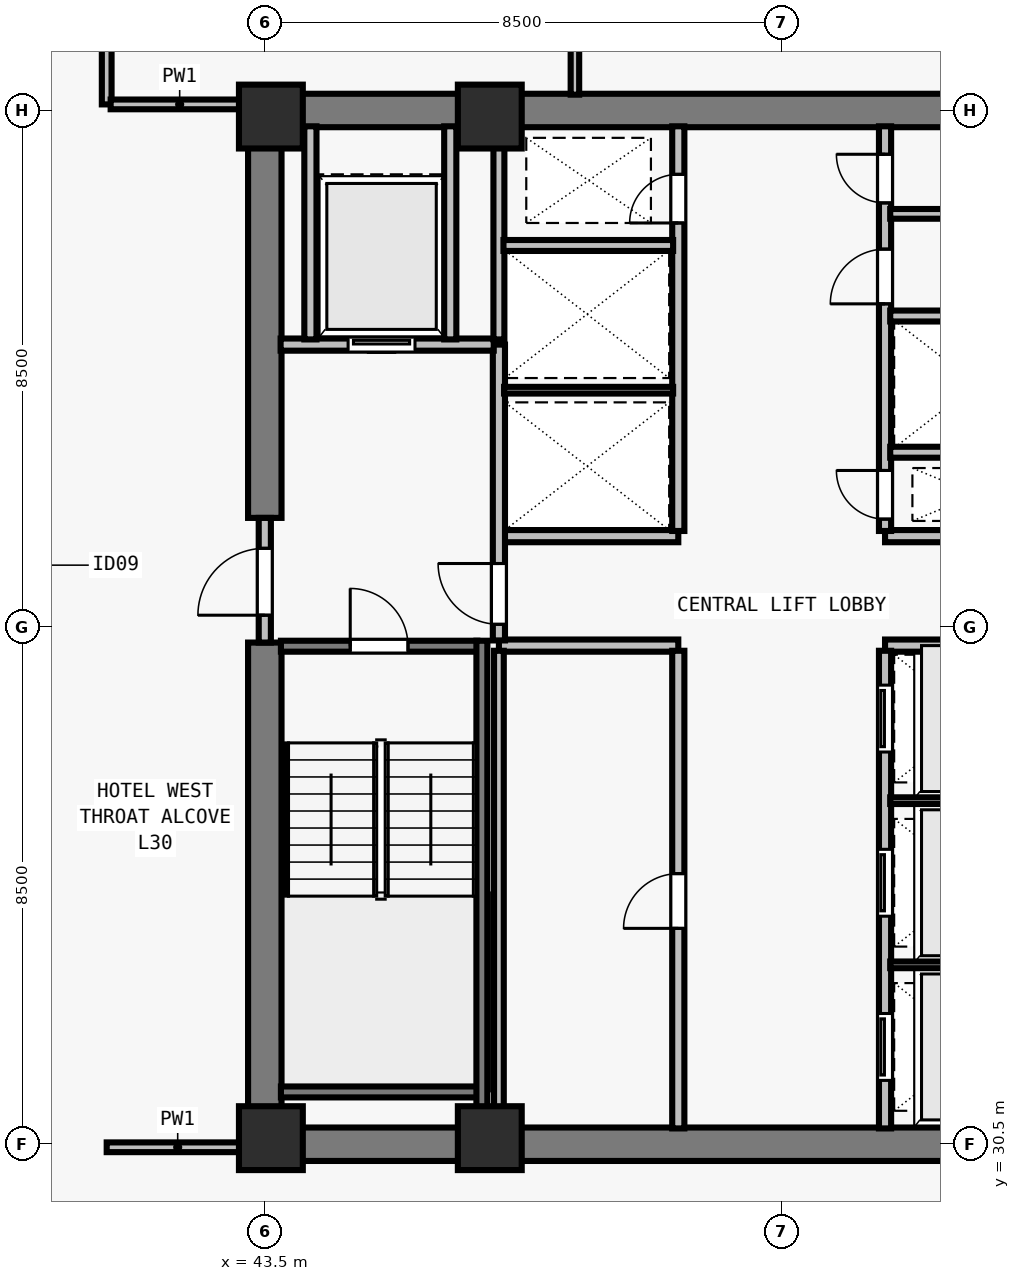
"""IFC4 building model, lengths in metres.
Left out: names, types, materials, properties, quantities, classifications, styles, units other than length and angle.
Written with IfcOpenShell. Run it as: python <this file> out.ifc"""

import sys

from ifc_helpers import new_model, si_unit, direction, frame, frame_2d, origin, origin_2d, place, context, subcontext, project, spatial, rectangle, extrude, element, fill, save


model = new_model("IFC4")
c1 = context("Model", 3, precision=1e-05, world=origin(), true_north=direction((0.0, 1.0)))
c2 = subcontext(c1, "Body", "Model", "MODEL_VIEW")
j1 = project(units=[si_unit("LENGTHUNIT", "METRE"), si_unit("PLANEANGLEUNIT", "RADIAN")], contexts=[c1])
p1 = place(None, origin())
s1 = spatial("IfcSite", under=j1, at=p1, CompositionType="ELEMENT")
p2 = place(p1, origin())
s2 = spatial("IfcBuilding", under=s1, at=p2, CompositionType="ELEMENT")
p3 = place(p2, frame((0.0, 0.0, 113.0)))
s3 = spatial("IfcBuildingStorey", under=s2, at=p3, CompositionType="ELEMENT", Elevation=113.0)
for number, where, z_axis, x_axis in (
    (1, (43.6, 30.6, 0.0), (0.0, 0.0, 1.0), (1.0, 0.0, 0.0)),
    (2, (47.2, 30.6, 0.0), (0.0, 0.0, 1.0), (1.0, 0.0, 0.0)),
    (3, (43.6, 47.4, 0.0), (0.0, 0.0, 1.0), (1.0, 0.0, 0.0)),
    (4, (47.2, 47.4, 0.0), (0.0, 0.0, 1.0), (1.0, 0.0, 0.0)),
):
    element("IfcColumn", number, at=place(p3, frame(where, z_axis=z_axis, x_axis=x_axis)), inside=s3, PredefinedType="COLUMN", context=c2, shape_type="SweptSolid", body=[
        extrude(rectangle(XDim=1.05, YDim=1.05, at=origin_2d()), origin(), (0.0, 0.0, 1.0), 3.5),
    ])
for number, where, z_axis, x_axis in (
    (5, (43.225, 30.5, 0.0), (0.0, 0.0, 1.0), (1.0, 0.0, 0.0)),
    (6, (43.225, 47.5, 0.0), (0.0, 0.0, 1.0), (1.0, 0.0, 0.0)),
):
    element("IfcWall", number, at=place(p3, frame(where, z_axis=z_axis, x_axis=x_axis)), inside=s3, PredefinedType="SHEAR", context=c2, shape_type="SweptSolid", body=[
        extrude(rectangle(XDim=17.55, YDim=0.55, at=frame_2d((8.775, 0.0))), origin(), (0.0, 0.0, 1.0), 3.28),
    ])
p4 = place(p3, frame((43.5, 30.765, 0.0), z_axis=(0.0, 0.0, 1.0), x_axis=(0.0, 1.0, 0.0)))
e7 = element("IfcWall", 7, at=p4, inside=s3, PredefinedType="SHEAR", context=c2, shape_type="SweptSolid", body=[
    extrude(rectangle(XDim=7.985, YDim=0.55, at=frame_2d((3.993, 0.0))), origin(), (0.0, 0.0, 1.0), 3.28),
])
p5 = place(p3, frame((43.5, 40.8, 0.0), z_axis=(0.0, 0.0, 1.0), x_axis=(0.0, 1.0, 0.0)))
e8 = element("IfcWall", 8, at=p5, inside=s3, PredefinedType="SHEAR", context=c2, shape_type="SweptSolid", body=[
    extrude(rectangle(XDim=6.435, YDim=0.55, at=frame_2d((3.218, 0.0))), origin(), (0.0, 0.0, 1.0), 3.28),
])
for number, where, z_axis, x_axis in (
    (9, (47.35, 38.7, 0.0), (0.0, 0.0, 1.0), (1.0, 0.0, 0.0)),
    (10, (47.35, 40.5, 0.0), (0.0, 0.0, 1.0), (1.0, 0.0, 0.0)),
    (11, (53.7, 38.7, 0.0), (0.0, 0.0, 1.0), (1.0, 0.0, 0.0)),
    (12, (53.7, 40.5, 0.0), (0.0, 0.0, 1.0), (1.0, 0.0, 0.0)),
):
    element("IfcWall", number, at=place(p3, frame(where, z_axis=z_axis, x_axis=x_axis)), inside=s3, PredefinedType="SOLIDWALL", context=c2, shape_type="SweptSolid", body=[
        extrude(rectangle(XDim=2.95, YDim=0.2, at=frame_2d((1.475, 0.0))), origin(), (0.0, 0.0, 1.0), 3.28),
    ])
p6 = place(p3, frame((50.3, 30.76, 0.0), z_axis=(0.0, 0.0, 1.0), x_axis=(0.0, 1.0, 0.0)))
e13 = element("IfcWall", 13, at=p6, inside=s3, PredefinedType="SOLIDWALL", context=c2, shape_type="SweptSolid", body=[
    extrude(rectangle(XDim=7.855, YDim=0.2, at=frame_2d((3.927, 0.0))), origin(), (0.0, 0.0, 1.0), 3.28),
])
p7 = place(p6, frame((3.29, 0.0, 0.0)))
e14 = element("IfcOpeningElement", 14, at=p7, cuts=e13, PredefinedType="OPENING", context=c2, shape_type="SweptSolid", body=[
    extrude(rectangle(XDim=0.9, YDim=2.12, at=frame_2d((0.45, 1.06))), frame((0.0, 0.11, 0.0), z_axis=(0.0, -1.0, 0.0), x_axis=(1.0, 0.0, 0.0)), (0.0, 0.0, 1.0), 0.22),
])
p8 = place(p3, frame((53.7, 30.76, 0.0), z_axis=(0.0, 0.0, 1.0), x_axis=(0.0, 1.0, 0.0)))
e15 = element("IfcWall", 15, at=p8, inside=s3, PredefinedType="SOLIDWALL", context=c2, shape_type="SweptSolid", body=[
    extrude(rectangle(XDim=7.855, YDim=0.2, at=frame_2d((3.927, 0.0))), origin(), (0.0, 0.0, 1.0), 3.28),
])
p9 = place(p8, frame((0.79, 0.0, 0.0)))
e16 = element("IfcOpeningElement", 16, at=p9, cuts=e15, PredefinedType="OPENING", context=c2, shape_type="SweptSolid", body=[
    extrude(rectangle(XDim=1.1, YDim=2.2, at=frame_2d((0.55, 1.1))), frame((0.0, 0.11, 0.0), z_axis=(0.0, -1.0, 0.0), x_axis=(1.0, 0.0, 0.0)), (0.0, 0.0, 1.0), 0.22),
])
p10 = place(p8, frame((3.49, 0.0, 0.0)))
e17 = element("IfcOpeningElement", 17, at=p10, cuts=e15, PredefinedType="OPENING", context=c2, shape_type="SweptSolid", body=[
    extrude(rectangle(XDim=1.1, YDim=2.2, at=frame_2d((0.55, 1.1))), frame((0.0, 0.11, 0.0), z_axis=(0.0, -1.0, 0.0), x_axis=(1.0, 0.0, 0.0)), (0.0, 0.0, 1.0), 0.22),
])
p11 = place(p8, frame((6.19, 0.0, 0.0)))
e18 = element("IfcOpeningElement", 18, at=p11, cuts=e15, PredefinedType="OPENING", context=c2, shape_type="SweptSolid", body=[
    extrude(rectangle(XDim=1.1, YDim=2.2, at=frame_2d((0.55, 1.1))), frame((0.0, 0.11, 0.0), z_axis=(0.0, -1.0, 0.0), x_axis=(1.0, 0.0, 0.0)), (0.0, 0.0, 1.0), 0.22),
])
p12 = place(p3, frame((50.3, 40.585, 0.0), z_axis=(0.0, 0.0, 1.0), x_axis=(0.0, 1.0, 0.0)))
e19 = element("IfcWall", 19, at=p12, inside=s3, PredefinedType="SOLIDWALL", context=c2, shape_type="SweptSolid", body=[
    extrude(rectangle(XDim=6.655, YDim=0.2, at=frame_2d((3.328, 0.0))), origin(), (0.0, 0.0, 1.0), 3.28),
])
p13 = place(p12, frame((5.065, 0.0, 0.0)))
e20 = element("IfcOpeningElement", 20, at=p13, cuts=e19, PredefinedType="OPENING", context=c2, shape_type="SweptSolid", body=[
    extrude(rectangle(XDim=0.8, YDim=2.08, at=frame_2d((0.4, 1.04))), frame((0.0, 0.11, 0.0), z_axis=(0.0, -1.0, 0.0), x_axis=(1.0, 0.0, 0.0)), (0.0, 0.0, 1.0), 0.22),
])
p14 = place(p3, frame((53.7, 40.585, 0.0), z_axis=(0.0, 0.0, 1.0), x_axis=(0.0, 1.0, 0.0)))
e21 = element("IfcWall", 21, at=p14, inside=s3, PredefinedType="SOLIDWALL", context=c2, shape_type="SweptSolid", body=[
    extrude(rectangle(XDim=6.655, YDim=0.2, at=frame_2d((3.328, 0.0))), origin(), (0.0, 0.0, 1.0), 3.28),
])
p15 = place(p14, frame((0.195, 0.0, 0.0)))
e22 = element("IfcOpeningElement", 22, at=p15, cuts=e21, PredefinedType="OPENING", context=c2, shape_type="SweptSolid", body=[
    extrude(rectangle(XDim=0.8, YDim=2.08, at=frame_2d((0.4, 1.04))), frame((0.0, 0.11, 0.0), z_axis=(0.0, -1.0, 0.0), x_axis=(1.0, 0.0, 0.0)), (0.0, 0.0, 1.0), 0.22),
])
p16 = place(p14, frame((3.735, 0.0, 0.0)))
e23 = element("IfcOpeningElement", 23, at=p16, cuts=e21, PredefinedType="OPENING", context=c2, shape_type="SweptSolid", body=[
    extrude(rectangle(XDim=0.9, YDim=2.12, at=frame_2d((0.45, 1.06))), frame((0.0, 0.11, 0.0), z_axis=(0.0, -1.0, 0.0), x_axis=(1.0, 0.0, 0.0)), (0.0, 0.0, 1.0), 0.22),
])
p17 = place(p14, frame((5.395, 0.0, 0.0)))
e24 = element("IfcOpeningElement", 24, at=p17, cuts=e21, PredefinedType="OPENING", context=c2, shape_type="SweptSolid", body=[
    extrude(rectangle(XDim=0.8, YDim=2.1, at=frame_2d((0.4, 1.05))), frame((0.0, 0.11, 0.0), z_axis=(0.0, -1.0, 0.0), x_axis=(1.0, 0.0, 0.0)), (0.0, 0.0, 1.0), 0.22),
])
p18 = place(p3, frame((43.5, 38.75, 0.0), z_axis=(0.0, 0.0, 1.0), x_axis=(0.0, 1.0, 0.0)))
e25 = element("IfcWall", 25, at=p18, inside=s3, PredefinedType="SOLIDWALL", context=c2, shape_type="SweptSolid", body=[
    extrude(rectangle(XDim=2.05, YDim=0.2, at=frame_2d((1.025, 0.0))), origin(), (0.0, 0.0, 1.0), 3.28),
])
p19 = place(p18, frame((0.45, 0.0, 0.0)))
e26 = element("IfcOpeningElement", 26, at=p19, cuts=e25, PredefinedType="OPENING", context=c2, shape_type="SweptSolid", body=[
    extrude(rectangle(XDim=1.1, YDim=2.15, at=frame_2d((0.55, 1.075))), frame((0.0, 0.11, 0.0), z_axis=(0.0, -1.0, 0.0), x_axis=(1.0, 0.0, 0.0)), (0.0, 0.0, 1.0), 0.22),
])
p20 = place(p3, frame((47.35, 38.785, 0.0), z_axis=(0.0, 0.0, 1.0), x_axis=(0.0, 1.0, 0.0)))
e27 = element("IfcWall", 27, at=p20, inside=s3, PredefinedType="SOLIDWALL", context=c2, shape_type="SweptSolid", body=[
    extrude(rectangle(XDim=4.865, YDim=0.2, at=frame_2d((2.433, 0.0))), origin(), (0.0, 0.0, 1.0), 3.28),
])
p21 = place(p20, frame((0.265, 0.0, 0.0)))
e28 = element("IfcOpeningElement", 28, at=p21, cuts=e27, PredefinedType="OPENING", context=c2, shape_type="SweptSolid", body=[
    extrude(rectangle(XDim=1.0, YDim=2.15, at=frame_2d((0.5, 1.075))), frame((0.0, 0.11, 0.0), z_axis=(0.0, -1.0, 0.0), x_axis=(1.0, 0.0, 0.0)), (0.0, 0.0, 1.0), 0.22),
])
p22 = place(p3, frame((43.76, 43.65, 0.0), z_axis=(0.0, 0.0, 1.0), x_axis=(1.0, 0.0, 0.0)))
e29 = element("IfcWall", 29, at=p22, inside=s3, PredefinedType="SOLIDWALL", context=c2, shape_type="SweptSolid", body=[
    extrude(rectangle(XDim=3.505, YDim=0.2, at=frame_2d((1.752, 0.0))), origin(), (0.0, 0.0, 1.0), 3.28),
])
p23 = place(p22, frame((1.11, 0.0, 0.0)))
e30 = element("IfcOpeningElement", 30, at=p23, cuts=e29, PredefinedType="OPENING", context=c2, shape_type="SweptSolid", body=[
    extrude(rectangle(XDim=1.1, YDim=2.2, at=frame_2d((0.55, 1.1))), frame((0.0, 0.11, 0.0), z_axis=(0.0, -1.0, 0.0), x_axis=(1.0, 0.0, 0.0)), (0.0, 0.0, 1.0), 0.22),
])
for number, where, z_axis, x_axis in (
    (31, (46.55, 43.735, 0.0), (0.0, 0.0, 1.0), (0.0, 1.0, 0.0)),
    (32, (44.25, 43.735, 0.0), (0.0, 0.0, 1.0), (0.0, 1.0, 0.0)),
):
    element("IfcWall", number, at=place(p3, frame(where, z_axis=z_axis, x_axis=x_axis)), inside=s3, PredefinedType="SOLIDWALL", context=c2, shape_type="SweptSolid", body=[
        extrude(rectangle(XDim=3.505, YDim=0.2, at=frame_2d((1.752, 0.0))), origin(), (0.0, 0.0, 1.0), 3.28),
    ])
p24 = place(p3, frame((47.35, 30.76, 0.0), z_axis=(0.0, 0.0, 1.0), x_axis=(0.0, 1.0, 0.0)))
e33 = element("IfcWall", 33, at=p24, inside=s3, PredefinedType="PARTITIONING", context=c2, shape_type="SweptSolid", body=[
    extrude(rectangle(XDim=7.855, YDim=0.16, at=frame_2d((3.927, 0.0))), origin(), (0.0, 0.0, 1.0), 3.28),
])
for number, where, z_axis, x_axis in (
    (34, (53.785, 33.45, 0.0), (0.0, 0.0, 1.0), (1.0, 0.0, 0.0)),
    (35, (53.785, 36.15, 0.0), (0.0, 0.0, 1.0), (1.0, 0.0, 0.0)),
):
    element("IfcWall", number, at=place(p3, frame(where, z_axis=z_axis, x_axis=x_axis)), inside=s3, PredefinedType="PARTITIONING", context=c2, shape_type="SweptSolid", body=[
        extrude(rectangle(XDim=2.79, YDim=0.11, at=frame_2d((1.395, 0.0))), origin(), (0.0, 0.0, 1.0), 3.28),
    ])
p25 = place(p3, frame((47.35, 43.735, 0.0), z_axis=(0.0, 0.0, 1.0), x_axis=(0.0, 1.0, 0.0)))
e36 = element("IfcWall", 36, at=p25, inside=s3, PredefinedType="SOLIDWALL", context=c2, shape_type="SweptSolid", body=[
    extrude(rectangle(XDim=3.505, YDim=0.18, at=frame_2d((1.752, 0.0))), origin(), (0.0, 0.0, 1.0), 3.28),
])
p26 = place(p3, frame((47.435, 42.9, 0.0), z_axis=(0.0, 0.0, 1.0), x_axis=(1.0, 0.0, 0.0)))
e37 = element("IfcWall", 37, at=p26, inside=s3, PredefinedType="PARTITIONING", context=c2, shape_type="SweptSolid", body=[
    extrude(rectangle(XDim=2.78, YDim=0.11, at=frame_2d((1.39, 0.0))), origin(), (0.0, 0.0, 1.0), 3.28),
])
p27 = place(p3, frame((47.425, 45.28, 0.0), z_axis=(0.0, 0.0, 1.0), x_axis=(1.0, 0.0, 0.0)))
e38 = element("IfcWall", 38, at=p27, inside=s3, PredefinedType="SOLIDWALL", context=c2, shape_type="SweptSolid", body=[
    extrude(rectangle(XDim=2.79, YDim=0.18, at=frame_2d((1.395, 0.0))), origin(), (0.0, 0.0, 1.0), 3.28),
])
p28 = place(p3, frame((53.785, 41.88, 0.0), z_axis=(0.0, 0.0, 1.0), x_axis=(1.0, 0.0, 0.0)))
e39 = element("IfcWall", 39, at=p28, inside=s3, PredefinedType="SOLIDWALL", context=c2, shape_type="SweptSolid", body=[
    extrude(rectangle(XDim=2.78, YDim=0.18, at=frame_2d((1.39, 0.0))), origin(), (0.0, 0.0, 1.0), 3.28),
])
p29 = place(p3, frame((53.785, 44.12, 0.0), z_axis=(0.0, 0.0, 1.0), x_axis=(1.0, 0.0, 0.0)))
e40 = element("IfcWall", 40, at=p29, inside=s3, PredefinedType="SOLIDWALL", context=c2, shape_type="SweptSolid", body=[
    extrude(rectangle(XDim=2.79, YDim=0.18, at=frame_2d((1.395, 0.0))), origin(), (0.0, 0.0, 1.0), 3.28),
])
p30 = place(p3, frame((53.785, 45.8, 0.0), z_axis=(0.0, 0.0, 1.0), x_axis=(1.0, 0.0, 0.0)))
e41 = element("IfcWall", 41, at=p30, inside=s3, PredefinedType="PARTITIONING", context=c2, shape_type="SweptSolid", body=[
    extrude(rectangle(XDim=2.79, YDim=0.16, at=frame_2d((1.395, 0.0))), origin(), (0.0, 0.0, 1.0), 3.28),
])
p31 = place(p3, frame((40.9, 47.6, 0.0), z_axis=(0.0, 0.0, 1.0), x_axis=(0.0, 1.0, 0.0)))
e42 = element("IfcWall", 42, at=p31, inside=s3, PredefinedType="PARTITIONING", context=c2, shape_type="SweptSolid", body=[
    extrude(rectangle(XDim=15.075, YDim=0.16, at=frame_2d((7.538, 0.0))), origin(), (0.0, 0.0, 1.0), 2.555),
])
p32 = place(p31, frame((3.5, 0.0, 0.0)))
e43 = element("IfcOpeningElement", 43, at=p32, cuts=e42, PredefinedType="OPENING", context=c2, shape_type="SweptSolid", body=[
    extrude(rectangle(XDim=0.96, YDim=2.12, at=frame_2d((0.48, 1.06))), frame((0.0, 0.09, 0.0), z_axis=(0.0, -1.0, 0.0), x_axis=(1.0, 0.0, 0.0)), (0.0, 0.0, 1.0), 0.18),
])
p33 = place(p3, frame((40.9, 30.45, 0.0), z_axis=(0.0, 0.0, 1.0), x_axis=(1.0, 0.0, 0.0)))
e44 = element("IfcWall", 44, at=p33, inside=s3, PredefinedType="PARTITIONING", context=c2, shape_type="SweptSolid", body=[
    extrude(rectangle(XDim=2.335, YDim=0.16, at=frame_2d((1.167, 0.0))), origin(), (0.0, 0.0, 1.0), 3.28),
])
p34 = place(p3, frame((40.965, 47.6, 0.0), z_axis=(0.0, 0.0, 1.0), x_axis=(1.0, 0.0, 0.0)))
e45 = element("IfcWall", 45, at=p34, inside=s3, PredefinedType="PARTITIONING", context=c2, shape_type="SweptSolid", body=[
    extrude(rectangle(XDim=2.27, YDim=0.16, at=frame_2d((1.135, 0.0))), origin(), (0.0, 0.0, 1.0), 3.28),
])
p35 = place(p3, frame((48.6, 47.76, 0.0), z_axis=(0.0, 0.0, 1.0), x_axis=(0.0, 1.0, 0.0)))
e46 = element("IfcWall", 46, at=p35, inside=s3, PredefinedType="PARTITIONING", context=c2, shape_type="SweptSolid", body=[
    extrude(rectangle(XDim=14.915, YDim=0.14, at=frame_2d((7.458, 0.0))), origin(), (0.0, 0.0, 1.0), 2.896),
])
p36 = place(p35, frame((2.34, 0.0, 0.0)))
e47 = element("IfcOpeningElement", 47, at=p36, cuts=e46, PredefinedType="OPENING", context=c2, shape_type="SweptSolid", body=[
    extrude(rectangle(XDim=0.96, YDim=2.12, at=frame_2d((0.48, 1.06))), frame((0.0, 0.08, 0.0), z_axis=(0.0, -1.0, 0.0), x_axis=(1.0, 0.0, 0.0)), (0.0, 0.0, 1.0), 0.16),
])
p37 = place(p3, frame((43.765, 38.69, 0.0), z_axis=(0.0, 0.0, 1.0), x_axis=(1.0, 0.0, 0.0)))
e48 = element("IfcWall", 48, at=p37, inside=s3, PredefinedType="SOLIDWALL", context=c2, shape_type="SweptSolid", body=[
    extrude(rectangle(XDim=3.23, YDim=0.18, at=frame_2d((1.615, 0.0))), origin(), (0.0, 0.0, 1.0), 3.28),
])
p38 = place(p37, frame((1.14, 0.0, 0.0)))
e49 = element("IfcOpeningElement", 49, at=p38, cuts=e48, PredefinedType="OPENING", context=c2, shape_type="SweptSolid", body=[
    extrude(rectangle(XDim=0.95, YDim=2.15, at=frame_2d((0.475, 1.075))), frame((0.0, 0.1, 0.0), z_axis=(0.0, -1.0, 0.0), x_axis=(1.0, 0.0, 0.0)), (0.0, 0.0, 1.0), 0.2),
])
p39 = place(p3, frame((43.765, 31.36, 0.0), z_axis=(0.0, 0.0, 1.0), x_axis=(1.0, 0.0, 0.0)))
e50 = element("IfcWall", 50, at=p39, inside=s3, PredefinedType="SOLIDWALL", context=c2, shape_type="SweptSolid", body=[
    extrude(rectangle(XDim=3.23, YDim=0.18, at=frame_2d((1.615, 0.0))), origin(), (0.0, 0.0, 1.0), 3.28),
])
p40 = place(p3, frame((47.07, 38.78, 0.0), z_axis=(0.0, 0.0, 1.0), x_axis=(0.0, -1.0, 0.0)))
e51 = element("IfcWall", 51, at=p40, inside=s3, PredefinedType="SOLIDWALL", context=c2, shape_type="SweptSolid", body=[
    extrude(rectangle(XDim=8.017, YDim=0.18, at=frame_2d((4.009, 0.0))), origin(), (0.0, 0.0, 1.0), 3.28),
])
p41 = place(p19, origin())
e52 = element("IfcDoor", 52, at=p41, inside=s3, OperationType="SINGLE_SWING_LEFT", PredefinedType="DOOR", context=c2, shape_type="SweptSolid", body=[
    extrude(rectangle(XDim=1.1, YDim=2.15, at=frame_2d((0.55, 1.075))), frame((0.0, 0.025, 0.0), z_axis=(0.0, -1.0, 0.0), x_axis=(1.0, 0.0, 0.0)), (0.0, 0.0, 1.0), 0.05),
])
fill(e26, e52)
p42 = place(p21, origin())
e53 = element("IfcDoor", 53, at=p42, inside=s3, OperationType="SINGLE_SWING_RIGHT", PredefinedType="DOOR", context=c2, shape_type="SweptSolid", body=[
    extrude(rectangle(XDim=1.0, YDim=2.15, at=frame_2d((0.5, 1.075))), frame((0.0, 0.025, 0.0), z_axis=(0.0, -1.0, 0.0), x_axis=(1.0, 0.0, 0.0)), (0.0, 0.0, 1.0), 0.05),
])
fill(e28, e53)
p43 = place(p23, origin())
e54 = element("IfcDoor", 54, at=p43, inside=s3, OperationType="SLIDING_TO_LEFT", PredefinedType="DOOR", context=c2, shape_type="SweptSolid", body=[
    extrude(rectangle(XDim=1.1, YDim=2.2, at=frame_2d((0.55, 1.1))), frame((0.0, 0.025, 0.0), z_axis=(0.0, -1.0, 0.0), x_axis=(1.0, 0.0, 0.0)), (0.0, 0.0, 1.0), 0.05),
])
fill(e30, e54)
p44 = place(p7, origin())
e55 = element("IfcDoor", 55, at=p44, inside=s3, OperationType="SINGLE_SWING_LEFT", PredefinedType="DOOR", context=c2, shape_type="SweptSolid", body=[
    extrude(rectangle(XDim=0.9, YDim=2.12, at=frame_2d((0.45, 1.06))), frame((0.0, 0.025, 0.0), z_axis=(0.0, -1.0, 0.0), x_axis=(1.0, 0.0, 0.0)), (0.0, 0.0, 1.0), 0.05),
])
fill(e14, e55)
p45 = place(p9, origin())
e56 = element("IfcDoor", 56, at=p45, inside=s3, OperationType="SLIDING_TO_LEFT", PredefinedType="DOOR", context=c2, shape_type="SweptSolid", body=[
    extrude(rectangle(XDim=1.1, YDim=2.2, at=frame_2d((0.55, 1.1))), frame((0.0, 0.025, 0.0), z_axis=(0.0, -1.0, 0.0), x_axis=(1.0, 0.0, 0.0)), (0.0, 0.0, 1.0), 0.05),
])
fill(e16, e56)
p46 = place(p10, origin())
e57 = element("IfcDoor", 57, at=p46, inside=s3, OperationType="SLIDING_TO_LEFT", PredefinedType="DOOR", context=c2, shape_type="SweptSolid", body=[
    extrude(rectangle(XDim=1.1, YDim=2.2, at=frame_2d((0.55, 1.1))), frame((0.0, 0.025, 0.0), z_axis=(0.0, -1.0, 0.0), x_axis=(1.0, 0.0, 0.0)), (0.0, 0.0, 1.0), 0.05),
])
fill(e17, e57)
p47 = place(p11, origin())
e58 = element("IfcDoor", 58, at=p47, inside=s3, OperationType="SLIDING_TO_LEFT", PredefinedType="DOOR", context=c2, shape_type="SweptSolid", body=[
    extrude(rectangle(XDim=1.1, YDim=2.2, at=frame_2d((0.55, 1.1))), frame((0.0, 0.025, 0.0), z_axis=(0.0, -1.0, 0.0), x_axis=(1.0, 0.0, 0.0)), (0.0, 0.0, 1.0), 0.05),
])
fill(e18, e58)
p48 = place(p13, origin())
e59 = element("IfcDoor", 59, at=p48, inside=s3, OperationType="SINGLE_SWING_LEFT", PredefinedType="DOOR", context=c2, shape_type="SweptSolid", body=[
    extrude(rectangle(XDim=0.8, YDim=2.08, at=frame_2d((0.4, 1.04))), frame((0.0, 0.025, 0.0), z_axis=(0.0, -1.0, 0.0), x_axis=(1.0, 0.0, 0.0)), (0.0, 0.0, 1.0), 0.05),
])
fill(e20, e59)
p49 = place(p15, origin())
e60 = element("IfcDoor", 60, at=p49, inside=s3, OperationType="SINGLE_SWING_RIGHT", PredefinedType="DOOR", context=c2, shape_type="SweptSolid", body=[
    extrude(rectangle(XDim=0.8, YDim=2.08, at=frame_2d((0.4, 1.04))), frame((0.0, 0.025, 0.0), z_axis=(0.0, -1.0, 0.0), x_axis=(1.0, 0.0, 0.0)), (0.0, 0.0, 1.0), 0.05),
])
fill(e22, e60)
p50 = place(p16, origin())
e61 = element("IfcDoor", 61, at=p50, inside=s3, OperationType="SINGLE_SWING_LEFT", PredefinedType="DOOR", context=c2, shape_type="SweptSolid", body=[
    extrude(rectangle(XDim=0.9, YDim=2.12, at=frame_2d((0.45, 1.06))), frame((0.0, 0.025, 0.0), z_axis=(0.0, -1.0, 0.0), x_axis=(1.0, 0.0, 0.0)), (0.0, 0.0, 1.0), 0.05),
])
fill(e23, e61)
p51 = place(p17, origin())
e62 = element("IfcDoor", 62, at=p51, inside=s3, OperationType="SINGLE_SWING_RIGHT", PredefinedType="DOOR", context=c2, shape_type="SweptSolid", body=[
    extrude(rectangle(XDim=0.8, YDim=2.1, at=frame_2d((0.4, 1.05))), frame((0.0, 0.025, 0.0), z_axis=(0.0, -1.0, 0.0), x_axis=(1.0, 0.0, 0.0)), (0.0, 0.0, 1.0), 0.05),
])
fill(e24, e62)
p52 = place(p38, origin())
e63 = element("IfcDoor", 63, at=p52, inside=s3, OperationType="SINGLE_SWING_LEFT", PredefinedType="DOOR", context=c2, shape_type="SweptSolid", body=[
    extrude(rectangle(XDim=0.95, YDim=2.15, at=frame_2d((0.475, 1.075))), frame((0.0, 0.025, 0.0), z_axis=(0.0, -1.0, 0.0), x_axis=(1.0, 0.0, 0.0)), (0.0, 0.0, 1.0), 0.05),
])
fill(e49, e63)
save(model, sys.argv[1])
